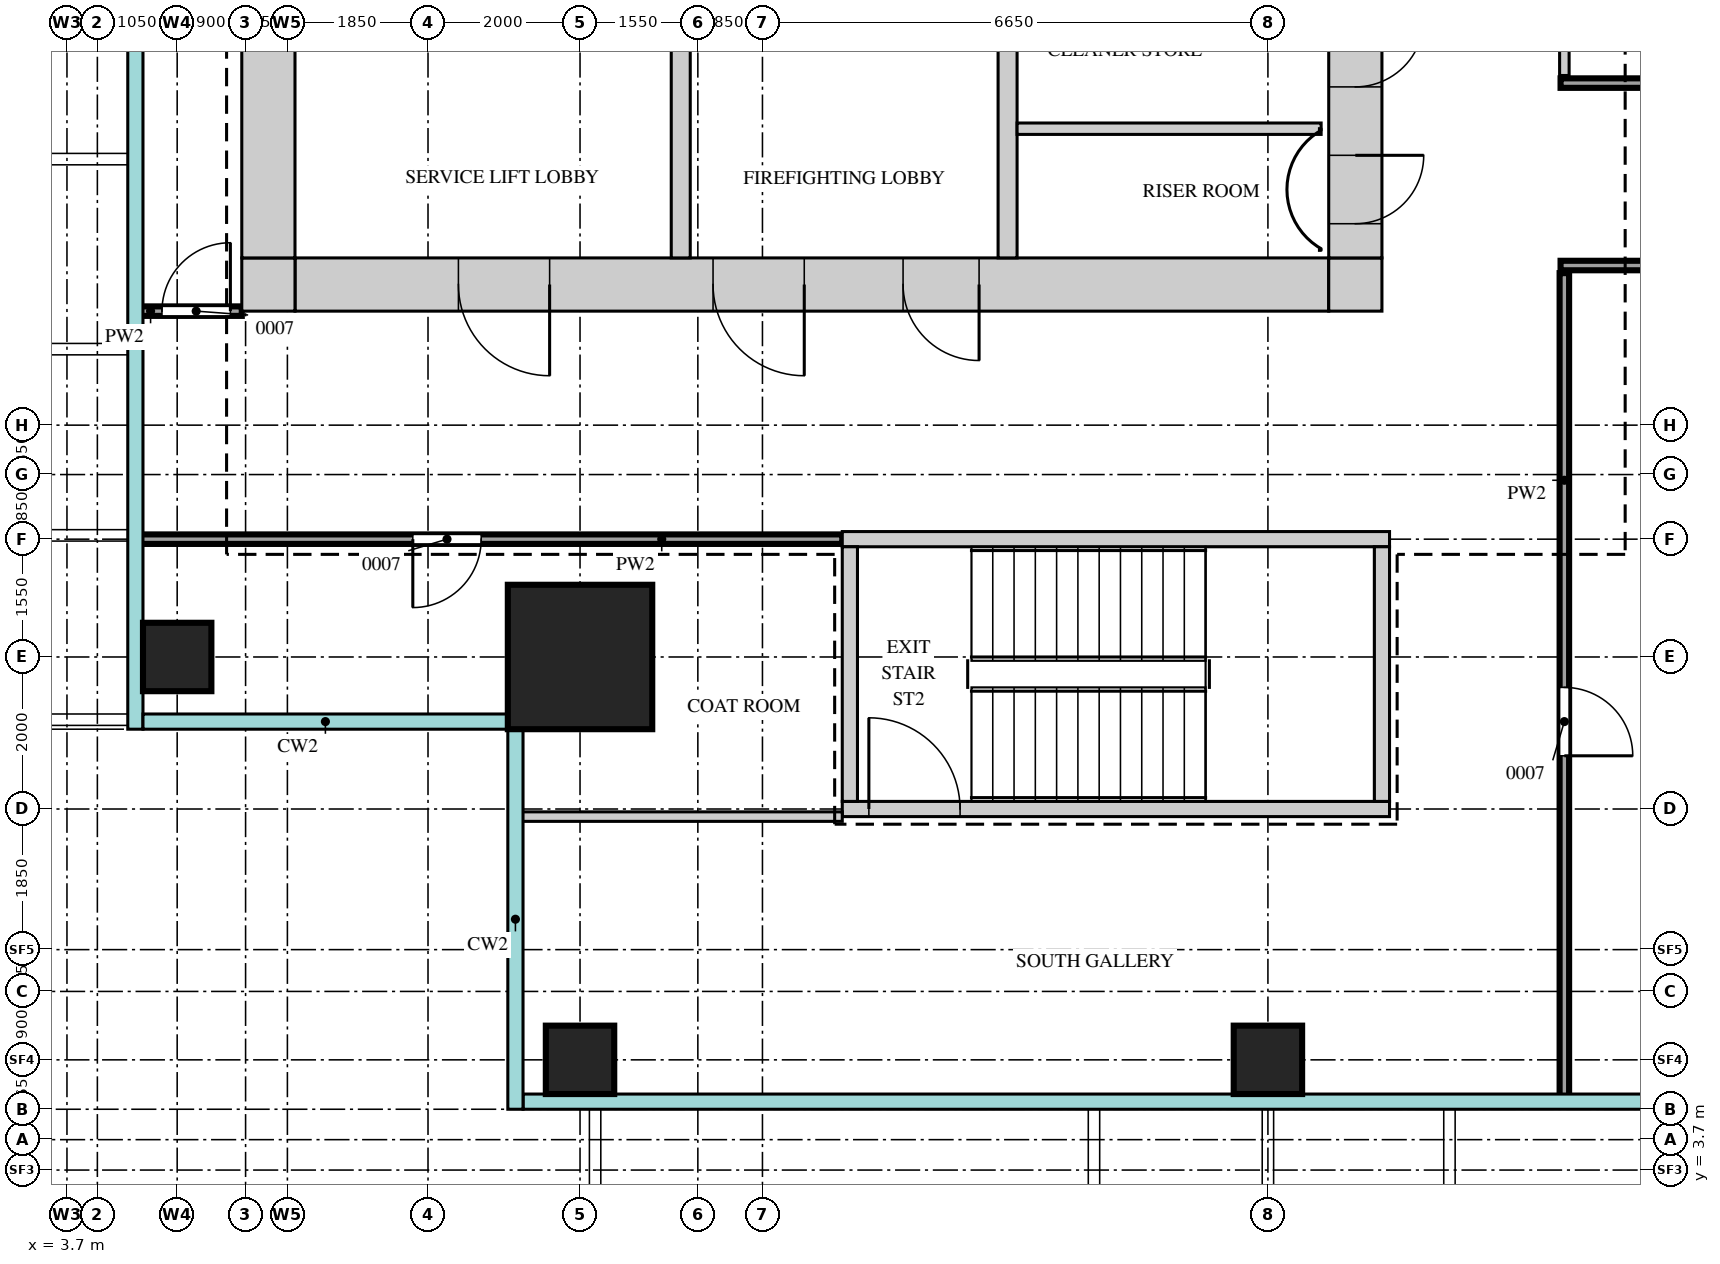
"""IFC4 building model, lengths in metres.
Left out: names, types, materials, properties, quantities, classifications, styles, units other than length and angle.
Written with IfcOpenShell. Run it as: python <this file> out.ifc"""

import sys

from ifc_helpers import new_model, si_unit, direction, frame, frame_2d, origin, origin_2d, place, context, subcontext, project, spatial, rectangle, extrude, source, transform, mapped, element, fill, save


model = new_model("IFC4")
c1 = context("Model", 3, precision=1e-05, world=origin(), true_north=direction((0.0, 1.0)))
c2 = subcontext(c1, "Body", "Model", "MODEL_VIEW")
j1 = project(units=[si_unit("LENGTHUNIT", "METRE"), si_unit("PLANEANGLEUNIT", "RADIAN")], contexts=[c1])
p1 = place(None, origin())
s1 = spatial("IfcSite", under=j1, at=p1, CompositionType="ELEMENT")
p2 = place(p1, origin())
s2 = spatial("IfcBuilding", under=s1, at=p2, CompositionType="ELEMENT")
p3 = place(p2, frame((0.0, 0.0, 258.2)))
s3 = spatial("IfcBuildingStorey", under=s2, at=p3, CompositionType="ELEMENT", Elevation=258.2)
m1 = source(origin(), c2, "Body", "SweptSolid", [
    extrude(rectangle(XDim=13.6, YDim=0.7, at=frame_2d((6.8, 0.0))), origin(), (0.0, 0.0, 1.0), 3.75),
])
p4 = place(p3, frame((6.7, 15.35, 0.0), z_axis=(0.0, 0.0, 1.0), x_axis=(1.0, 0.0, 0.0)))
e1 = element("IfcWall", 1, at=p4, inside=s3, PredefinedType="SHEAR", context=c2, shape_type="MappedRepresentation", body=[
    mapped(m1, transform((0.0, 0.0, 0.0))),
])
m2 = source(origin(), c2, "Body", "SweptSolid", [
    extrude(rectangle(XDim=1.2, YDim=2.1, at=frame_2d((0.6, 1.05))), frame((0.0, 0.36, 0.0), z_axis=(0.0, -1.0, 0.0), x_axis=(1.0, 0.0, 0.0)), (0.0, 0.0, 1.0), 0.72),
])
p5 = place(p4, frame((5.5, 0.0, 0.0)))
e2 = element("IfcOpeningElement", 2, at=p5, cuts=e1, PredefinedType="OPENING", context=c2, shape_type="MappedRepresentation", body=[
    mapped(m2, transform((0.0, 0.0, 0.0))),
])
p6 = place(p4, frame((2.15, 0.0, 0.0)))
e3 = element("IfcOpeningElement", 3, at=p6, cuts=e1, PredefinedType="OPENING", context=c2, shape_type="MappedRepresentation", body=[
    mapped(m2, transform((0.0, 0.0, 0.0))),
])
m3 = source(origin(), c2, "Body", "SweptSolid", [
    extrude(rectangle(XDim=1.0, YDim=2.1, at=frame_2d((0.5, 1.05))), frame((0.0, 0.36, 0.0), z_axis=(0.0, -1.0, 0.0), x_axis=(1.0, 0.0, 0.0)), (0.0, 0.0, 1.0), 0.72),
])
p7 = place(p4, frame((8.0, 0.0, 0.0)))
e4 = element("IfcOpeningElement", 4, at=p7, cuts=e1, PredefinedType="OPENING", context=c2, shape_type="MappedRepresentation", body=[
    mapped(m3, transform((0.0, 0.0, 0.0))),
])
m4 = source(origin(), c2, "Body", "SweptSolid", [
    extrude(rectangle(XDim=0.7, YDim=0.7, at=frame_2d((0.35, 0.0))), origin(), (0.0, 0.0, 1.0), 3.75),
])
for number, where, z_axis, x_axis in (
    (5, (20.3, 15.35, 0.0), (0.0, 0.0, 1.0), (1.0, 0.0, 0.0)),
    (6, (6.0, 15.35, 0.0), (0.0, 0.0, 1.0), (1.0, 0.0, 0.0)),
):
    element("IfcWall", number, at=place(p3, frame(where, z_axis=z_axis, x_axis=x_axis)), inside=s3, PredefinedType="SHEAR", context=c2, shape_type="MappedRepresentation", body=[
        mapped(m4, transform((0.0, 0.0, 0.0))),
    ])
m5 = source(origin(), c2, "Body", "SweptSolid", [
    extrude(rectangle(XDim=22.6, YDim=0.7, at=frame_2d((11.3, 0.0))), origin(), (0.0, 0.0, 1.0), 3.75),
])
p8 = place(p3, frame((20.65, 15.7, 0.0), z_axis=(0.0, 0.0, 1.0), x_axis=(0.0, 1.0, 0.0)))
e7 = element("IfcWall", 7, at=p8, inside=s3, PredefinedType="SHEAR", context=c2, shape_type="MappedRepresentation", body=[
    mapped(m5, transform((0.0, 0.0, 0.0))),
])
m6 = source(origin(), c2, "Body", "SweptSolid", [
    extrude(rectangle(XDim=1.8, YDim=2.1, at=frame_2d((0.9, 1.05))), frame((0.0, 0.36, 0.0), z_axis=(0.0, -1.0, 0.0), x_axis=(1.0, 0.0, 0.0)), (0.0, 0.0, 1.0), 0.72),
])
p9 = place(p8, frame((10.8, 0.0, 0.0)))
e8 = element("IfcOpeningElement", 8, at=p9, cuts=e7, PredefinedType="OPENING", context=c2, shape_type="MappedRepresentation", body=[
    mapped(m6, transform((0.0, 0.0, 0.0))),
])
m7 = source(origin(), c2, "Body", "SweptSolid", [
    extrude(rectangle(XDim=0.9, YDim=2.1, at=frame_2d((0.45, 1.05))), frame((0.0, 0.36, 0.0), z_axis=(0.0, -1.0, 0.0), x_axis=(1.0, 0.0, 0.0)), (0.0, 0.0, 1.0), 0.72),
])
p10 = place(p8, frame((0.45, 0.0, 0.0)))
e9 = element("IfcOpeningElement", 9, at=p10, cuts=e7, PredefinedType="OPENING", context=c2, shape_type="MappedRepresentation", body=[
    mapped(m7, transform((0.0, 0.0, 0.0))),
])
p11 = place(p8, frame((2.25, 0.0, 0.0)))
e10 = element("IfcOpeningElement", 10, at=p11, cuts=e7, PredefinedType="OPENING", context=c2, shape_type="MappedRepresentation", body=[
    mapped(m7, transform((0.0, 0.0, 0.0))),
])
p12 = place(p8, frame((4.95, 0.0, 0.0)))
e11 = element("IfcOpeningElement", 11, at=p12, cuts=e7, PredefinedType="OPENING", context=c2, shape_type="MappedRepresentation", body=[
    mapped(m3, transform((0.0, 0.0, 0.0))),
])
p13 = place(p3, frame((6.35, 15.7, 0.0), z_axis=(0.0, 0.0, 1.0), x_axis=(0.0, 1.0, 0.0)))
e12 = element("IfcWall", 12, at=p13, inside=s3, PredefinedType="SHEAR", context=c2, shape_type="MappedRepresentation", body=[
    mapped(m5, transform((0.0, 0.0, 0.0))),
])
m8 = source(origin(), c2, "Body", "SweptSolid", [
    extrude(rectangle(XDim=7.2, YDim=0.2, at=frame_2d((3.6, 0.0))), origin(), (0.0, 0.0, 1.0), 3.75),
])
p14 = place(p3, frame((13.9, 12.0, 0.0), z_axis=(0.0, 0.0, 1.0), x_axis=(1.0, 0.0, 0.0)))
e13 = element("IfcWall", 13, at=p14, inside=s3, PredefinedType="SHEAR", context=c2, shape_type="MappedRepresentation", body=[
    mapped(m8, transform((0.0, 0.0, 0.0))),
])
p15 = place(p3, frame((13.9, 8.45, 0.0), z_axis=(0.0, 0.0, 1.0), x_axis=(1.0, 0.0, 0.0)))
e14 = element("IfcWall", 14, at=p15, inside=s3, PredefinedType="SHEAR", context=c2, shape_type="MappedRepresentation", body=[
    mapped(m8, transform((0.0, 0.0, 0.0))),
])
m9 = source(origin(), c2, "Body", "SweptSolid", [
    extrude(rectangle(XDim=1.2, YDim=2.1, at=frame_2d((0.6, 1.05))), frame((0.0, 0.11, 0.0), z_axis=(0.0, -1.0, 0.0), x_axis=(1.0, 0.0, 0.0)), (0.0, 0.0, 1.0), 0.22),
])
p16 = place(p15, frame((0.35, 0.0, 0.0)))
e15 = element("IfcOpeningElement", 15, at=p16, cuts=e14, PredefinedType="OPENING", context=c2, shape_type="MappedRepresentation", body=[
    mapped(m9, transform((0.0, 0.0, 0.0))),
])
m10 = source(origin(), c2, "Body", "SweptSolid", [
    extrude(rectangle(XDim=3.35, YDim=0.2, at=frame_2d((1.675, 0.0))), origin(), (0.0, 0.0, 1.0), 3.75),
])
for number, where, z_axis, x_axis in (
    (16, (21.0, 8.55, 0.0), (0.0, 0.0, 1.0), (0.0, 1.0, 0.0)),
    (17, (14.0, 8.55, 0.0), (0.0, 0.0, 1.0), (0.0, 1.0, 0.0)),
):
    element("IfcWall", number, at=place(p3, frame(where, z_axis=z_axis, x_axis=x_axis)), inside=s3, PredefinedType="SHEAR", context=c2, shape_type="MappedRepresentation", body=[
        mapped(m10, transform((0.0, 0.0, 0.0))),
    ])
m11 = source(origin(), c2, "Body", "SweptSolid", [
    extrude(rectangle(XDim=3.5, YDim=0.25, at=frame_2d((1.75, 0.0))), origin(), (0.0, 0.0, 1.0), 3.75),
])
for number, where, z_axis, x_axis in (
    (18, (16.075, 15.7, 0.0), (0.0, 0.0, 1.0), (0.0, 1.0, 0.0)),
    (19, (11.775, 15.7, 0.0), (0.0, 0.0, 1.0), (0.0, 1.0, 0.0)),
):
    element("IfcWall", number, at=place(p3, frame(where, z_axis=z_axis, x_axis=x_axis)), inside=s3, PredefinedType="STANDARD", context=c2, shape_type="MappedRepresentation", body=[
        mapped(m11, transform((0.0, 0.0, 0.0))),
    ])
m12 = source(origin(), c2, "Body", "SweptSolid", [
    extrude(rectangle(XDim=1.9, YDim=1.9, at=origin_2d()), origin(), (0.0, 0.0, 1.0), 4.0),
])
p17 = place(p3, frame((10.45, 10.45, 0.0), z_axis=(0.0, 0.0, 1.0), x_axis=(1.0, 0.0, 0.0)))
e20 = element("IfcColumn", 20, at=p17, inside=s3, PredefinedType="COLUMN", context=c2, shape_type="MappedRepresentation", body=[
    mapped(m12, transform((0.0, 0.0, 0.0))),
])
m13 = source(origin(), c2, "Body", "SweptSolid", [
    extrude(rectangle(XDim=0.9, YDim=0.9, at=origin_2d()), origin(), (0.0, 0.0, 1.0), 3.75),
])
for number, where, z_axis, x_axis in (
    (21, (10.45, 5.15, 0.0), (0.0, 0.0, 1.0), (1.0, 0.0, 0.0)),
    (22, (19.5, 5.15, 0.0), (0.0, 0.0, 1.0), (1.0, 0.0, 0.0)),
    (23, (5.15, 10.45, 0.0), (0.0, 0.0, 1.0), (1.0, 0.0, 0.0)),
):
    element("IfcColumn", number, at=place(p3, frame(where, z_axis=z_axis, x_axis=x_axis)), inside=s3, PredefinedType="COLUMN", context=c2, shape_type="MappedRepresentation", body=[
        mapped(m13, transform((0.0, 0.0, 0.0))),
    ])
m14 = source(origin(), c2, "Body", "SweptSolid", [
    extrude(rectangle(XDim=10.85, YDim=0.125, at=frame_2d((5.425, 0.0))), origin(), (0.0, 0.0, 1.0), 3.8),
])
p18 = place(p3, frame((23.4, 4.65, 0.0), z_axis=(0.0, 0.0, 1.0), x_axis=(0.0, 1.0, 0.0)))
e24 = element("IfcWall", 24, at=p18, inside=s3, PredefinedType="PARTITIONING", context=c2, shape_type="MappedRepresentation", body=[
    mapped(m14, transform((0.0, 0.0, 0.0))),
])
m15 = source(origin(), c2, "Body", "SweptSolid", [
    extrude(rectangle(XDim=0.9, YDim=2.1, at=frame_2d((0.45, 1.05))), frame((0.0, 0.073, 0.0), z_axis=(0.0, -1.0, 0.0), x_axis=(1.0, 0.0, 0.0)), (0.0, 0.0, 1.0), 0.145),
])
p19 = place(p18, frame((4.5, 0.0, 0.0)))
e25 = element("IfcOpeningElement", 25, at=p19, cuts=e24, PredefinedType="OPENING", context=c2, shape_type="MappedRepresentation", body=[
    mapped(m15, transform((0.0, 0.0, 0.0))),
])
m16 = source(origin(), c2, "Body", "SweptSolid", [
    extrude(rectangle(XDim=4.25, YDim=0.125, at=frame_2d((2.125, 0.0))), origin(), (0.0, 0.0, 1.0), 3.8),
])
p20 = place(p3, frame((9.65, 8.35, 0.0), z_axis=(0.0, 0.0, 1.0), x_axis=(1.0, 0.0, 0.0)))
e26 = element("IfcWall", 26, at=p20, inside=s3, PredefinedType="PARTITIONING", context=c2, shape_type="MappedRepresentation", body=[
    mapped(m16, transform((0.0, 0.0, 0.0))),
])
m17 = source(origin(), c2, "Body", "SweptSolid", [
    extrude(rectangle(XDim=9.25, YDim=0.125, at=frame_2d((4.625, 0.0))), origin(), (0.0, 0.0, 1.0), 3.8),
])
p21 = place(p3, frame((4.65, 12.0, 0.0), z_axis=(0.0, 0.0, 1.0), x_axis=(1.0, 0.0, 0.0)))
e27 = element("IfcWall", 27, at=p21, inside=s3, PredefinedType="PARTITIONING", context=c2, shape_type="MappedRepresentation", body=[
    mapped(m17, transform((0.0, 0.0, 0.0))),
])
p22 = place(p21, frame((3.6, 0.0, 0.0)))
e28 = element("IfcOpeningElement", 28, at=p22, cuts=e27, PredefinedType="OPENING", context=c2, shape_type="MappedRepresentation", body=[
    mapped(m15, transform((0.0, 0.0, 0.0))),
])
m18 = source(origin(), c2, "Body", "SweptSolid", [
    extrude(rectangle(XDim=1.35, YDim=0.125, at=frame_2d((0.675, 0.0))), origin(), (0.0, 0.0, 1.0), 3.8),
])
p23 = place(p3, frame((4.65, 15.0, 0.0), z_axis=(0.0, 0.0, 1.0), x_axis=(1.0, 0.0, 0.0)))
e29 = element("IfcWall", 29, at=p23, inside=s3, PredefinedType="PARTITIONING", context=c2, shape_type="MappedRepresentation", body=[
    mapped(m18, transform((0.0, 0.0, 0.0))),
])
p24 = place(p23, frame((0.3, 0.0, 0.0)))
e30 = element("IfcOpeningElement", 30, at=p24, cuts=e29, PredefinedType="OPENING", context=c2, shape_type="MappedRepresentation", body=[
    mapped(m15, transform((0.0, 0.0, 0.0))),
])
m19 = source(origin(), c2, "Body", "SweptSolid", [
    extrude(rectangle(XDim=26.0, YDim=0.125, at=frame_2d((13.0, 0.0))), origin(), (0.0, 0.0, 1.0), 3.8),
])
p25 = place(p3, frame((23.35, 15.6, 0.0), z_axis=(0.0, 0.0, 1.0), x_axis=(1.0, 0.0, 0.0)))
e31 = element("IfcWall", 31, at=p25, inside=s3, PredefinedType="PARTITIONING", context=c2, shape_type="MappedRepresentation", body=[
    mapped(m19, transform((0.0, 0.0, 0.0))),
])
m20 = source(origin(), c2, "Body", "SweptSolid", [
    extrude(rectangle(XDim=1.2, YDim=2.1, at=frame_2d((0.6, 1.05))), frame((0.0, 0.073, 0.0), z_axis=(0.0, -1.0, 0.0), x_axis=(1.0, 0.0, 0.0)), (0.0, 0.0, 1.0), 0.145),
])
p26 = place(p25, frame((16.55, 0.0, 0.0)))
e32 = element("IfcOpeningElement", 32, at=p26, cuts=e31, PredefinedType="OPENING", context=c2, shape_type="MappedRepresentation", body=[
    mapped(m20, transform((0.0, 0.0, 0.0))),
])
m21 = source(origin(), c2, "Body", "SweptSolid", [
    extrude(rectangle(XDim=4.0, YDim=0.15, at=frame_2d((2.0, 0.0))), origin(), (0.0, 0.0, 1.0), 3.8),
])
p27 = place(p3, frame((16.2, 17.4, 0.0), z_axis=(0.0, 0.0, 1.0), x_axis=(1.0, 0.0, 0.0)))
e33 = element("IfcWall", 33, at=p27, inside=s3, PredefinedType="PARTITIONING", context=c2, shape_type="MappedRepresentation", body=[
    mapped(m21, transform((0.0, 0.0, 0.0))),
])
p28 = place(p3, frame((23.35, 18.0, 0.0), z_axis=(0.0, 0.0, 1.0), x_axis=(1.0, 0.0, 0.0)))
e34 = element("IfcWall", 34, at=p28, inside=s3, PredefinedType="PARTITIONING", context=c2, shape_type="MappedRepresentation", body=[
    mapped(m19, transform((0.0, 0.0, 0.0))),
])
p29 = place(p28, frame((8.5, 0.0, 0.0)))
e35 = element("IfcOpeningElement", 35, at=p29, cuts=e34, PredefinedType="OPENING", context=c2, shape_type="MappedRepresentation", body=[
    mapped(m20, transform((0.0, 0.0, 0.0))),
])
p30 = place(p28, frame((15.3, 0.0, 0.0)))
e36 = element("IfcOpeningElement", 36, at=p30, cuts=e34, PredefinedType="OPENING", context=c2, shape_type="MappedRepresentation", body=[
    mapped(m15, transform((0.0, 0.0, 0.0))),
])
p31 = place(p28, frame((21.8, 0.0, 0.0)))
e37 = element("IfcOpeningElement", 37, at=p31, cuts=e34, PredefinedType="OPENING", context=c2, shape_type="MappedRepresentation", body=[
    mapped(m20, transform((0.0, 0.0, 0.0))),
])
m22 = source(origin(), c2, "Body", "SweptSolid", [
    extrude(rectangle(XDim=18.4, YDim=0.125, at=frame_2d((9.2, 0.0))), origin(), (0.0, 0.0, 1.0), 3.8),
])
p32 = place(p3, frame((23.4, 18.1, 0.0), z_axis=(0.0, 0.0, 1.0), x_axis=(0.0, 1.0, 0.0)))
e38 = element("IfcWall", 38, at=p32, inside=s3, PredefinedType="PARTITIONING", context=c2, shape_type="MappedRepresentation", body=[
    mapped(m22, transform((0.0, 0.0, 0.0))),
])
p33 = place(p32, frame((8.9, 0.0, 0.0)))
e39 = element("IfcOpeningElement", 39, at=p33, cuts=e38, PredefinedType="OPENING", context=c2, shape_type="MappedRepresentation", body=[
    mapped(m15, transform((0.0, 0.0, 0.0))),
])
m23 = source(origin(), c2, "Body", "SweptSolid", [
    extrude(rectangle(XDim=0.9, YDim=2.1, at=frame_2d((0.45, 1.05))), frame((0.0, 0.3, 0.0), z_axis=(0.0, -1.0, 0.0), x_axis=(1.0, 0.0, 0.0)), (0.0, 0.0, 1.0), 0.6),
])
p34 = place(p10, origin())
e40 = element("IfcDoor", 40, at=p34, inside=s3, OperationType="SINGLE_SWING_RIGHT", PredefinedType="DOOR", context=c2, shape_type="MappedRepresentation", body=[
    mapped(m23, transform((0.0, 0.0, 0.0))),
])
fill(e9, e40)
p35 = place(p11, origin())
e41 = element("IfcDoor", 41, at=p35, inside=s3, OperationType="SINGLE_SWING_RIGHT", PredefinedType="DOOR", context=c2, shape_type="MappedRepresentation", body=[
    mapped(m23, transform((0.0, 0.0, 0.0))),
])
fill(e10, e41)
m24 = source(origin(), c2, "Body", "SweptSolid", [
    extrude(rectangle(XDim=1.2, YDim=2.1, at=frame_2d((0.6, 1.05))), frame((0.0, 0.3, 0.0), z_axis=(0.0, -1.0, 0.0), x_axis=(1.0, 0.0, 0.0)), (0.0, 0.0, 1.0), 0.6),
])
p36 = place(p5, origin())
e42 = element("IfcDoor", 42, at=p36, inside=s3, OperationType="SINGLE_SWING_RIGHT", PredefinedType="DOOR", context=c2, shape_type="MappedRepresentation", body=[
    mapped(m24, transform((0.0, 0.0, 0.0))),
])
fill(e2, e42)
p37 = place(p6, origin())
e43 = element("IfcDoor", 43, at=p37, inside=s3, OperationType="SINGLE_SWING_RIGHT", PredefinedType="DOOR", context=c2, shape_type="MappedRepresentation", body=[
    mapped(m24, transform((0.0, 0.0, 0.0))),
])
fill(e3, e43)
m25 = source(origin(), c2, "Body", "SweptSolid", [
    extrude(rectangle(XDim=1.0, YDim=2.1, at=frame_2d((0.5, 1.05))), frame((0.0, 0.3, 0.0), z_axis=(0.0, -1.0, 0.0), x_axis=(1.0, 0.0, 0.0)), (0.0, 0.0, 1.0), 0.6),
])
p38 = place(p7, origin())
e44 = element("IfcDoor", 44, at=p38, inside=s3, OperationType="SINGLE_SWING_RIGHT", PredefinedType="DOOR", context=c2, shape_type="MappedRepresentation", body=[
    mapped(m25, transform((0.0, 0.0, 0.0))),
])
fill(e4, e44)
m26 = source(origin(), c2, "Body", "SweptSolid", [
    extrude(rectangle(XDim=0.9, YDim=2.1, at=frame_2d((0.45, 1.05))), frame((0.0, 0.025, 0.0), z_axis=(0.0, -1.0, 0.0), x_axis=(1.0, 0.0, 0.0)), (0.0, 0.0, 1.0), 0.05),
])
p39 = place(p24, origin())
e45 = element("IfcDoor", 45, at=p39, inside=s3, OperationType="SINGLE_SWING_LEFT", PredefinedType="DOOR", context=c2, shape_type="MappedRepresentation", body=[
    mapped(m26, transform((0.0, 0.0, 0.0))),
])
fill(e30, e45)
p40 = place(p22, origin())
e46 = element("IfcDoor", 46, at=p40, inside=s3, OperationType="SINGLE_SWING_LEFT", PredefinedType="DOOR", context=c2, shape_type="MappedRepresentation", body=[
    mapped(m26, transform((0.0, 0.0, 0.0))),
])
fill(e28, e46)
p41 = place(p19, origin())
e47 = element("IfcDoor", 47, at=p41, inside=s3, OperationType="SINGLE_SWING_LEFT", PredefinedType="DOOR", context=c2, shape_type="MappedRepresentation", body=[
    mapped(m26, transform((0.0, 0.0, 0.0))),
])
fill(e25, e47)
m27 = source(origin(), c2, "Body", "SweptSolid", [
    extrude(rectangle(XDim=1.2, YDim=2.1, at=frame_2d((0.6, 1.05))), frame((0.0, 0.025, 0.0), z_axis=(0.0, -1.0, 0.0), x_axis=(1.0, 0.0, 0.0)), (0.0, 0.0, 1.0), 0.05),
])
p42 = place(p16, origin())
e48 = element("IfcDoor", 48, at=p42, inside=s3, OperationType="SINGLE_SWING_RIGHT", PredefinedType="DOOR", context=c2, shape_type="MappedRepresentation", body=[
    mapped(m27, transform((0.0, 0.0, 0.0))),
])
fill(e15, e48)
save(model, sys.argv[1])
